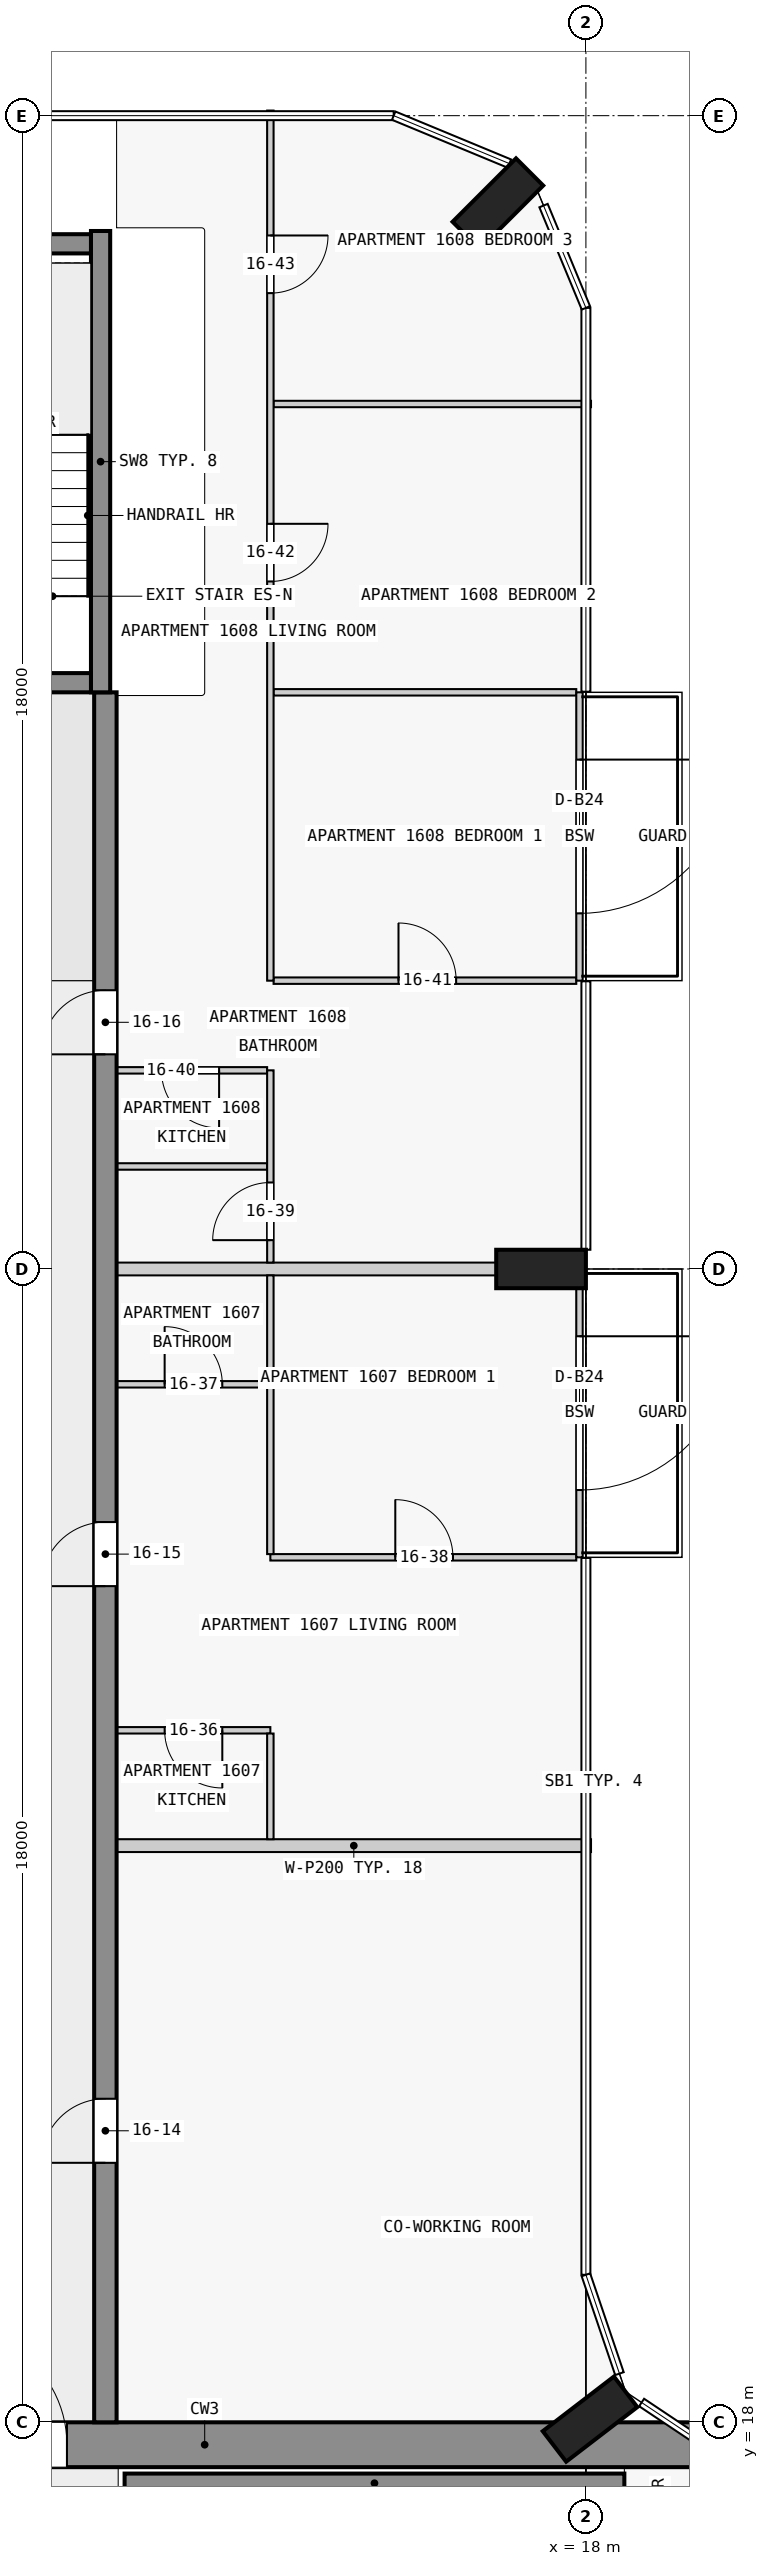
"""IFC4 building model, lengths in metres.
Left out: names, types, materials, properties, quantities, classifications, styles, units other than length and angle.
Written with IfcOpenShell. Run it as: python <this file> out.ifc"""

import sys

from ifc_helpers import new_model, si_unit, direction, frame, frame_2d, origin, origin_2d, place, context, subcontext, project, spatial, rectangle, extrude, element, fill, save


model = new_model("IFC4")
c1 = context("Model", 3, precision=1e-05, world=origin(), true_north=direction((0.0, 1.0)))
c2 = subcontext(c1, "Body", "Model", "MODEL_VIEW")
j1 = project(units=[si_unit("LENGTHUNIT", "METRE"), si_unit("PLANEANGLEUNIT", "RADIAN")], contexts=[c1])
p1 = place(None, origin())
s1 = spatial("IfcSite", under=j1, at=p1, CompositionType="ELEMENT")
p2 = place(p1, origin())
s2 = spatial("IfcBuilding", under=s1, at=p2, CompositionType="ELEMENT")
p3 = place(p2, frame((0.0, 0.0, 65.3)))
s3 = spatial("IfcBuildingStorey", under=s2, at=p3, CompositionType="ELEMENT", Elevation=65.3)
for number, where, z_axis, x_axis in (
    (1, (18.065, 18.05, 0.0), (0.0, 0.0, 1.0), (-0.609, 0.793, 0.0)),
    (2, (17.3, 36.0, 0.0), (0.0, 0.0, 1.0), (0.0, 1.0, 0.0)),
    (3, (16.626, 52.626, 0.0), (0.0, 0.0, 1.0), (-0.707, 0.707, 0.0)),
):
    element("IfcColumn", number, at=place(p3, frame(where, z_axis=z_axis, x_axis=x_axis)), inside=s3, PredefinedType="COLUMN", context=c2, shape_type="SweptSolid", body=[
        extrude(rectangle(XDim=0.6, YDim=1.4, at=origin_2d()), origin(), (0.0, 0.0, 1.0), 3.5),
    ])
p4 = place(p3, frame((1.6, 17.65, 0.0), z_axis=(0.0, 0.0, 1.0), x_axis=(1.0, 0.0, 0.0)))
e4 = element("IfcWall", 4, at=p4, inside=s3, PredefinedType="SHEAR", context=c2, shape_type="SweptSolid", body=[
    extrude(rectangle(XDim=20.9, YDim=0.7, at=frame_2d((10.45, 0.0))), origin(), (0.0, 0.0, 1.0), 3.25),
])
p5 = place(p4, frame((6.5, 0.0, 0.0)))
e5 = element("IfcOpeningElement", 5, at=p5, cuts=e4, PredefinedType="OPENING", context=c2, shape_type="SweptSolid", body=[
    extrude(rectangle(XDim=1.8, YDim=2.1, at=frame_2d((0.9, 1.05))), frame((0.0, 0.36, 0.0), z_axis=(0.0, -1.0, 0.0), x_axis=(1.0, 0.0, 0.0)), (0.0, 0.0, 1.0), 0.72),
])
p6 = place(p3, frame((10.8, 17.05, 0.0), z_axis=(0.0, 0.0, 1.0), x_axis=(1.0, 0.0, 0.0)))
e6 = element("IfcWall", 6, at=p6, inside=s3, PredefinedType="SHEAR", context=c2, shape_type="SweptSolid", body=[
    extrude(rectangle(XDim=7.8, YDim=0.3, at=frame_2d((3.9, 0.0))), origin(), (0.0, 0.0, 1.0), 3.25),
])
p7 = place(p3, frame((7.725, 45.15, 0.0), z_axis=(0.0, 0.0, 1.0), x_axis=(1.0, 0.0, 0.0)))
e7 = element("IfcWall", 7, at=p7, inside=s3, PredefinedType="SHEAR", context=c2, shape_type="SweptSolid", body=[
    extrude(rectangle(XDim=2.55, YDim=0.3, at=frame_2d((1.275, 0.0))), origin(), (0.0, 0.0, 1.0), 3.5),
])
p8 = place(p7, frame((0.725, 0.0, 0.0)))
e8 = element("IfcOpeningElement", 8, at=p8, cuts=e7, PredefinedType="OPENING", context=c2, shape_type="SweptSolid", body=[
    extrude(rectangle(XDim=1.1, YDim=2.1, at=frame_2d((0.55, 1.05))), frame((0.0, 0.16, 0.0), z_axis=(0.0, -1.0, 0.0), x_axis=(1.0, 0.0, 0.0)), (0.0, 0.0, 1.0), 0.32),
])
p9 = place(p3, frame((7.725, 52.0, 0.0), z_axis=(0.0, 0.0, 1.0), x_axis=(1.0, 0.0, 0.0)))
e9 = element("IfcWall", 9, at=p9, inside=s3, PredefinedType="SHEAR", context=c2, shape_type="SweptSolid", body=[
    extrude(rectangle(XDim=2.55, YDim=0.3, at=frame_2d((1.275, 0.0))), origin(), (0.0, 0.0, 1.0), 3.5),
])
p10 = place(p3, frame((10.425, 45.0, 0.0), z_axis=(0.0, 0.0, 1.0), x_axis=(0.0, 1.0, 0.0)))
e10 = element("IfcWall", 10, at=p10, inside=s3, PredefinedType="SHEAR", context=c2, shape_type="SweptSolid", body=[
    extrude(rectangle(XDim=7.2, YDim=0.3, at=frame_2d((3.6, 0.0))), origin(), (0.0, 0.0, 1.0), 3.5),
])
p11 = place(p3, frame((10.5, 18.0, 0.0), z_axis=(0.0, 0.0, 1.0), x_axis=(0.0, 1.0, 0.0)))
e11 = element("IfcWall", 11, at=p11, inside=s3, PredefinedType="SHEAR", context=c2, shape_type="SweptSolid", body=[
    extrude(rectangle(XDim=27.0, YDim=0.35, at=frame_2d((13.5, 0.0))), origin(), (0.0, 0.0, 1.0), 3.25),
])
p12 = place(p11, frame((4.05, 0.0, 0.0)))
e12 = element("IfcOpeningElement", 12, at=p12, cuts=e11, PredefinedType="OPENING", context=c2, shape_type="SweptSolid", body=[
    extrude(rectangle(XDim=1.0, YDim=2.1, at=frame_2d((0.5, 1.05))), frame((0.0, 0.185, 0.0), z_axis=(0.0, -1.0, 0.0), x_axis=(1.0, 0.0, 0.0)), (0.0, 0.0, 1.0), 0.37),
])
p13 = place(p11, frame((13.05, 0.0, 0.0)))
e13 = element("IfcOpeningElement", 13, at=p13, cuts=e11, PredefinedType="OPENING", context=c2, shape_type="SweptSolid", body=[
    extrude(rectangle(XDim=1.0, YDim=2.1, at=frame_2d((0.5, 1.05))), frame((0.0, 0.185, 0.0), z_axis=(0.0, -1.0, 0.0), x_axis=(1.0, 0.0, 0.0)), (0.0, 0.0, 1.0), 0.37),
])
p14 = place(p11, frame((21.35, 0.0, 0.0)))
e14 = element("IfcOpeningElement", 14, at=p14, cuts=e11, PredefinedType="OPENING", context=c2, shape_type="SweptSolid", body=[
    extrude(rectangle(XDim=1.0, YDim=2.1, at=frame_2d((0.5, 1.05))), frame((0.0, 0.185, 0.0), z_axis=(0.0, -1.0, 0.0), x_axis=(1.0, 0.0, 0.0)), (0.0, 0.0, 1.0), 0.37),
])
p15 = place(p3, frame((17.9, 36.0, 0.0), z_axis=(0.0, 0.0, 1.0), x_axis=(0.0, -1.0, 0.0)))
e15 = element("IfcWall", 15, at=p15, inside=s3, PredefinedType="STANDARD", context=c2, shape_type="SweptSolid", body=[
    extrude(rectangle(XDim=4.5, YDim=0.1, at=frame_2d((2.25, 0.0))), origin(), (0.0, 0.0, 1.0), 3.25),
])
p16 = place(p15, frame((1.05, 0.0, 0.0)))
e16 = element("IfcOpeningElement", 16, at=p16, cuts=e15, PredefinedType="OPENING", context=c2, shape_type="SweptSolid", body=[
    extrude(rectangle(XDim=2.4, YDim=2.4, at=frame_2d((1.2, 1.2))), frame((0.0, 0.06, 0.0), z_axis=(0.0, -1.0, 0.0), x_axis=(1.0, 0.0, 0.0)), (0.0, 0.0, 1.0), 0.12),
])
p17 = place(p3, frame((17.9, 45.0, 0.0), z_axis=(0.0, 0.0, 1.0), x_axis=(0.0, -1.0, 0.0)))
e17 = element("IfcWall", 17, at=p17, inside=s3, PredefinedType="STANDARD", context=c2, shape_type="SweptSolid", body=[
    extrude(rectangle(XDim=4.5, YDim=0.1, at=frame_2d((2.25, 0.0))), origin(), (0.0, 0.0, 1.0), 3.25),
])
p18 = place(p17, frame((1.05, 0.0, 0.0)))
e18 = element("IfcOpeningElement", 18, at=p18, cuts=e17, PredefinedType="OPENING", context=c2, shape_type="SweptSolid", body=[
    extrude(rectangle(XDim=2.4, YDim=2.4, at=frame_2d((1.2, 1.2))), frame((0.0, 0.06, 0.0), z_axis=(0.0, -1.0, 0.0), x_axis=(1.0, 0.0, 0.0)), (0.0, 0.0, 1.0), 0.12),
])
p19 = place(p3, frame((18.08, 27.0, 0.0), z_axis=(0.0, 0.0, 1.0), x_axis=(-1.0, 0.0, 0.0)))
e19 = element("IfcWall", 19, at=p19, inside=s3, PredefinedType="PARTITIONING", context=c2, shape_type="SweptSolid", body=[
    extrude(rectangle(XDim=7.405, YDim=0.2, at=frame_2d((3.703, 0.0))), origin(), (0.0, 0.0, 1.0), 3.25),
])
p20 = place(p3, frame((13.075, 28.8, 0.0), z_axis=(0.0, 0.0, 1.0), x_axis=(-1.0, 0.0, 0.0)))
e20 = element("IfcWall", 20, at=p20, inside=s3, PredefinedType="PARTITIONING", context=c2, shape_type="SweptSolid", body=[
    extrude(rectangle(XDim=2.4, YDim=0.1, at=frame_2d((1.2, 0.0))), origin(), (0.0, 0.0, 1.0), 3.25),
])
p21 = place(p20, frame((0.75, 0.0, 0.0)))
e21 = element("IfcOpeningElement", 21, at=p21, cuts=e20, PredefinedType="OPENING", context=c2, shape_type="SweptSolid", body=[
    extrude(rectangle(XDim=0.9, YDim=2.1, at=frame_2d((0.45, 1.05))), frame((0.0, 0.06, 0.0), z_axis=(0.0, -1.0, 0.0), x_axis=(1.0, 0.0, 0.0)), (0.0, 0.0, 1.0), 0.12),
])
p22 = place(p3, frame((13.075, 31.5, 0.0), z_axis=(0.0, 0.0, 1.0), x_axis=(1.0, 0.0, 0.0)))
e22 = element("IfcWall", 22, at=p22, inside=s3, PredefinedType="PARTITIONING", context=c2, shape_type="SweptSolid", body=[
    extrude(rectangle(XDim=4.775, YDim=0.1, at=frame_2d((2.388, 0.0))), origin(), (0.0, 0.0, 1.0), 3.25),
])
p23 = place(p22, frame((1.95, 0.0, 0.0)))
e23 = element("IfcOpeningElement", 23, at=p23, cuts=e22, PredefinedType="OPENING", context=c2, shape_type="SweptSolid", body=[
    extrude(rectangle(XDim=0.9, YDim=2.1, at=frame_2d((0.45, 1.05))), frame((0.0, 0.06, 0.0), z_axis=(0.0, -1.0, 0.0), x_axis=(1.0, 0.0, 0.0)), (0.0, 0.0, 1.0), 0.12),
])
p24 = place(p3, frame((10.675, 34.2, 0.0), z_axis=(0.0, 0.0, 1.0), x_axis=(1.0, 0.0, 0.0)))
e24 = element("IfcWall", 24, at=p24, inside=s3, PredefinedType="PARTITIONING", context=c2, shape_type="SweptSolid", body=[
    extrude(rectangle(XDim=2.35, YDim=0.1, at=frame_2d((1.175, 0.0))), origin(), (0.0, 0.0, 1.0), 3.25),
])
p25 = place(p24, frame((0.75, 0.0, 0.0)))
e25 = element("IfcOpeningElement", 25, at=p25, cuts=e24, PredefinedType="OPENING", context=c2, shape_type="SweptSolid", body=[
    extrude(rectangle(XDim=0.9, YDim=2.1, at=frame_2d((0.45, 1.05))), frame((0.0, 0.06, 0.0), z_axis=(0.0, -1.0, 0.0), x_axis=(1.0, 0.0, 0.0)), (0.0, 0.0, 1.0), 0.12),
])
p26 = place(p3, frame((16.6, 36.0, 0.0), z_axis=(0.0, 0.0, 1.0), x_axis=(-1.0, 0.0, 0.0)))
e26 = element("IfcWall", 26, at=p26, inside=s3, PredefinedType="PARTITIONING", context=c2, shape_type="SweptSolid", body=[
    extrude(rectangle(XDim=5.925, YDim=0.2, at=frame_2d((2.962, 0.0))), origin(), (0.0, 0.0, 1.0), 3.25),
])
p27 = place(p3, frame((13.025, 37.6, 0.0), z_axis=(0.0, 0.0, 1.0), x_axis=(-1.0, 0.0, 0.0)))
e27 = element("IfcWall", 27, at=p27, inside=s3, PredefinedType="PARTITIONING", context=c2, shape_type="SweptSolid", body=[
    extrude(rectangle(XDim=2.35, YDim=0.1, at=frame_2d((1.175, 0.0))), origin(), (0.0, 0.0, 1.0), 3.25),
])
p28 = place(p3, frame((13.025, 39.1, 0.0), z_axis=(0.0, 0.0, 1.0), x_axis=(-1.0, 0.0, 0.0)))
e28 = element("IfcWall", 28, at=p28, inside=s3, PredefinedType="PARTITIONING", context=c2, shape_type="SweptSolid", body=[
    extrude(rectangle(XDim=2.35, YDim=0.1, at=frame_2d((1.175, 0.0))), origin(), (0.0, 0.0, 1.0), 3.25),
])
p29 = place(p28, frame((0.75, 0.0, 0.0)))
e29 = element("IfcOpeningElement", 29, at=p29, cuts=e28, PredefinedType="OPENING", context=c2, shape_type="SweptSolid", body=[
    extrude(rectangle(XDim=0.9, YDim=2.1, at=frame_2d((0.45, 1.05))), frame((0.0, 0.06, 0.0), z_axis=(0.0, -1.0, 0.0), x_axis=(1.0, 0.0, 0.0)), (0.0, 0.0, 1.0), 0.12),
])
p30 = place(p3, frame((13.125, 40.5, 0.0), z_axis=(0.0, 0.0, 1.0), x_axis=(1.0, 0.0, 0.0)))
e30 = element("IfcWall", 30, at=p30, inside=s3, PredefinedType="PARTITIONING", context=c2, shape_type="SweptSolid", body=[
    extrude(rectangle(XDim=4.725, YDim=0.1, at=frame_2d((2.363, 0.0))), origin(), (0.0, 0.0, 1.0), 3.25),
])
p31 = place(p30, frame((1.95, 0.0, 0.0)))
e31 = element("IfcOpeningElement", 31, at=p31, cuts=e30, PredefinedType="OPENING", context=c2, shape_type="SweptSolid", body=[
    extrude(rectangle(XDim=0.9, YDim=2.1, at=frame_2d((0.45, 1.05))), frame((0.0, 0.06, 0.0), z_axis=(0.0, -1.0, 0.0), x_axis=(1.0, 0.0, 0.0)), (0.0, 0.0, 1.0), 0.12),
])
p32 = place(p3, frame((17.85, 45.0, 0.0), z_axis=(0.0, 0.0, 1.0), x_axis=(-1.0, 0.0, 0.0)))
e32 = element("IfcWall", 32, at=p32, inside=s3, PredefinedType="PARTITIONING", context=c2, shape_type="SweptSolid", body=[
    extrude(rectangle(XDim=4.725, YDim=0.1, at=frame_2d((2.363, 0.0))), origin(), (0.0, 0.0, 1.0), 3.25),
])
p33 = place(p3, frame((18.08, 49.5, 0.0), z_axis=(0.0, 0.0, 1.0), x_axis=(-1.0, 0.0, 0.0)))
e33 = element("IfcWall", 33, at=p33, inside=s3, PredefinedType="PARTITIONING", context=c2, shape_type="SweptSolid", body=[
    extrude(rectangle(XDim=4.955, YDim=0.1, at=frame_2d((2.478, 0.0))), origin(), (0.0, 0.0, 1.0), 3.25),
])
p34 = place(p3, frame((13.075, 34.15, 0.0), z_axis=(0.0, 0.0, 1.0), x_axis=(0.0, -1.0, 0.0)))
e34 = element("IfcWall", 34, at=p34, inside=s3, PredefinedType="PARTITIONING", context=c2, shape_type="SweptSolid", body=[
    extrude(rectangle(XDim=2.6, YDim=0.1, at=frame_2d((1.3, 0.0))), origin(), (0.0, 0.0, 1.0), 3.25),
])
p35 = place(p3, frame((13.075, 54.08, 0.0), z_axis=(0.0, 0.0, 1.0), x_axis=(0.0, -1.0, 0.0)))
e35 = element("IfcWall", 35, at=p35, inside=s3, PredefinedType="PARTITIONING", context=c2, shape_type="SweptSolid", body=[
    extrude(rectangle(XDim=13.58, YDim=0.1, at=frame_2d((6.79, 0.0))), origin(), (0.0, 0.0, 1.0), 3.25),
])
p36 = place(p35, frame((6.45, 0.0, 0.0)))
e36 = element("IfcOpeningElement", 36, at=p36, cuts=e35, PredefinedType="OPENING", context=c2, shape_type="SweptSolid", body=[
    extrude(rectangle(XDim=0.9, YDim=2.1, at=frame_2d((0.45, 1.05))), frame((0.0, 0.06, 0.0), z_axis=(0.0, -1.0, 0.0), x_axis=(1.0, 0.0, 0.0)), (0.0, 0.0, 1.0), 0.12),
])
p37 = place(p35, frame((1.95, 0.0, 0.0)))
e37 = element("IfcOpeningElement", 37, at=p37, cuts=e35, PredefinedType="OPENING", context=c2, shape_type="SweptSolid", body=[
    extrude(rectangle(XDim=0.9, YDim=2.1, at=frame_2d((0.45, 1.05))), frame((0.0, 0.06, 0.0), z_axis=(0.0, -1.0, 0.0), x_axis=(1.0, 0.0, 0.0)), (0.0, 0.0, 1.0), 0.12),
])
p38 = place(p3, frame((13.075, 27.1, 0.0), z_axis=(0.0, 0.0, 1.0), x_axis=(0.0, 1.0, 0.0)))
e38 = element("IfcWall", 38, at=p38, inside=s3, PredefinedType="PARTITIONING", context=c2, shape_type="SweptSolid", body=[
    extrude(rectangle(XDim=1.65, YDim=0.1, at=frame_2d((0.825, 0.0))), origin(), (0.0, 0.0, 1.0), 3.25),
])
p39 = place(p3, frame((13.075, 34.2, 0.0), z_axis=(0.0, 0.0, 1.0), x_axis=(0.0, 1.0, 0.0)))
e39 = element("IfcWall", 39, at=p39, inside=s3, PredefinedType="PARTITIONING", context=c2, shape_type="SweptSolid", body=[
    extrude(rectangle(XDim=1.7, YDim=0.1, at=frame_2d((0.85, 0.0))), origin(), (0.0, 0.0, 1.0), 3.25),
])
p40 = place(p3, frame((13.075, 36.1, 0.0), z_axis=(0.0, 0.0, 1.0), x_axis=(0.0, 1.0, 0.0)))
e40 = element("IfcWall", 40, at=p40, inside=s3, PredefinedType="PARTITIONING", context=c2, shape_type="SweptSolid", body=[
    extrude(rectangle(XDim=3.0, YDim=0.1, at=frame_2d((1.5, 0.0))), origin(), (0.0, 0.0, 1.0), 3.25),
])
p41 = place(p40, frame((0.35, 0.0, 0.0)))
e41 = element("IfcOpeningElement", 41, at=p41, cuts=e40, PredefinedType="OPENING", context=c2, shape_type="SweptSolid", body=[
    extrude(rectangle(XDim=0.9, YDim=2.1, at=frame_2d((0.45, 1.05))), frame((0.0, 0.06, 0.0), z_axis=(0.0, -1.0, 0.0), x_axis=(1.0, 0.0, 0.0)), (0.0, 0.0, 1.0), 0.12),
])
p42 = place(p16, origin())
e42 = element("IfcDoor", 42, at=p42, inside=s3, OperationType="SINGLE_SWING_LEFT", PredefinedType="DOOR", context=c2, shape_type="SweptSolid", body=[
    extrude(rectangle(XDim=2.4, YDim=2.4, at=frame_2d((1.2, 1.2))), frame((0.0, 0.025, 0.0), z_axis=(0.0, -1.0, 0.0), x_axis=(1.0, 0.0, 0.0)), (0.0, 0.0, 1.0), 0.05),
])
fill(e16, e42)
p43 = place(p18, origin())
e43 = element("IfcDoor", 43, at=p43, inside=s3, OperationType="SINGLE_SWING_LEFT", PredefinedType="DOOR", context=c2, shape_type="SweptSolid", body=[
    extrude(rectangle(XDim=2.4, YDim=2.4, at=frame_2d((1.2, 1.2))), frame((0.0, 0.025, 0.0), z_axis=(0.0, -1.0, 0.0), x_axis=(1.0, 0.0, 0.0)), (0.0, 0.0, 1.0), 0.05),
])
fill(e18, e43)
p44 = place(p5, origin())
e44 = element("IfcDoor", 44, at=p44, inside=s3, OperationType="DOUBLE_DOOR_SINGLE_SWING", PredefinedType="DOOR", context=c2, shape_type="SweptSolid", body=[
    extrude(rectangle(XDim=1.8, YDim=2.1, at=frame_2d((0.9, 1.05))), frame((0.0, 0.025, 0.0), z_axis=(0.0, -1.0, 0.0), x_axis=(1.0, 0.0, 0.0)), (0.0, 0.0, 1.0), 0.05),
])
fill(e5, e44)
p45 = place(p12, origin())
e45 = element("IfcDoor", 45, at=p45, inside=s3, OperationType="SINGLE_SWING_LEFT", PredefinedType="DOOR", context=c2, shape_type="SweptSolid", body=[
    extrude(rectangle(XDim=1.0, YDim=2.1, at=frame_2d((0.5, 1.05))), frame((0.0, 0.025, 0.0), z_axis=(0.0, -1.0, 0.0), x_axis=(1.0, 0.0, 0.0)), (0.0, 0.0, 1.0), 0.05),
])
fill(e12, e45)
p46 = place(p13, origin())
e46 = element("IfcDoor", 46, at=p46, inside=s3, OperationType="SINGLE_SWING_RIGHT", PredefinedType="DOOR", context=c2, shape_type="SweptSolid", body=[
    extrude(rectangle(XDim=1.0, YDim=2.1, at=frame_2d((0.5, 1.05))), frame((0.0, 0.025, 0.0), z_axis=(0.0, -1.0, 0.0), x_axis=(1.0, 0.0, 0.0)), (0.0, 0.0, 1.0), 0.05),
])
fill(e13, e46)
p47 = place(p14, origin())
e47 = element("IfcDoor", 47, at=p47, inside=s3, OperationType="SINGLE_SWING_RIGHT", PredefinedType="DOOR", context=c2, shape_type="SweptSolid", body=[
    extrude(rectangle(XDim=1.0, YDim=2.1, at=frame_2d((0.5, 1.05))), frame((0.0, 0.025, 0.0), z_axis=(0.0, -1.0, 0.0), x_axis=(1.0, 0.0, 0.0)), (0.0, 0.0, 1.0), 0.05),
])
fill(e14, e47)
p48 = place(p21, origin())
e48 = element("IfcDoor", 48, at=p48, inside=s3, OperationType="SINGLE_SWING_RIGHT", PredefinedType="DOOR", context=c2, shape_type="SweptSolid", body=[
    extrude(rectangle(XDim=0.9, YDim=2.1, at=frame_2d((0.45, 1.05))), frame((0.0, 0.025, 0.0), z_axis=(0.0, -1.0, 0.0), x_axis=(1.0, 0.0, 0.0)), (0.0, 0.0, 1.0), 0.05),
])
fill(e21, e48)
p49 = place(p25, origin())
e49 = element("IfcDoor", 49, at=p49, inside=s3, OperationType="SINGLE_SWING_RIGHT", PredefinedType="DOOR", context=c2, shape_type="SweptSolid", body=[
    extrude(rectangle(XDim=0.9, YDim=2.1, at=frame_2d((0.45, 1.05))), frame((0.0, 0.025, 0.0), z_axis=(0.0, -1.0, 0.0), x_axis=(1.0, 0.0, 0.0)), (0.0, 0.0, 1.0), 0.05),
])
fill(e25, e49)
p50 = place(p23, origin())
e50 = element("IfcDoor", 50, at=p50, inside=s3, OperationType="SINGLE_SWING_RIGHT", PredefinedType="DOOR", context=c2, shape_type="SweptSolid", body=[
    extrude(rectangle(XDim=0.9, YDim=2.1, at=frame_2d((0.45, 1.05))), frame((0.0, 0.025, 0.0), z_axis=(0.0, -1.0, 0.0), x_axis=(1.0, 0.0, 0.0)), (0.0, 0.0, 1.0), 0.05),
])
fill(e23, e50)
p51 = place(p41, origin())
e51 = element("IfcDoor", 51, at=p51, inside=s3, OperationType="SINGLE_SWING_LEFT", PredefinedType="DOOR", context=c2, shape_type="SweptSolid", body=[
    extrude(rectangle(XDim=0.9, YDim=2.1, at=frame_2d((0.45, 1.05))), frame((0.0, 0.025, 0.0), z_axis=(0.0, -1.0, 0.0), x_axis=(1.0, 0.0, 0.0)), (0.0, 0.0, 1.0), 0.05),
])
fill(e41, e51)
p52 = place(p29, origin())
e52 = element("IfcDoor", 52, at=p52, inside=s3, OperationType="SINGLE_SWING_RIGHT", PredefinedType="DOOR", context=c2, shape_type="SweptSolid", body=[
    extrude(rectangle(XDim=0.9, YDim=2.1, at=frame_2d((0.45, 1.05))), frame((0.0, 0.025, 0.0), z_axis=(0.0, -1.0, 0.0), x_axis=(1.0, 0.0, 0.0)), (0.0, 0.0, 1.0), 0.05),
])
fill(e29, e52)
p53 = place(p31, origin())
e53 = element("IfcDoor", 53, at=p53, inside=s3, OperationType="SINGLE_SWING_RIGHT", PredefinedType="DOOR", context=c2, shape_type="SweptSolid", body=[
    extrude(rectangle(XDim=0.9, YDim=2.1, at=frame_2d((0.45, 1.05))), frame((0.0, 0.025, 0.0), z_axis=(0.0, -1.0, 0.0), x_axis=(1.0, 0.0, 0.0)), (0.0, 0.0, 1.0), 0.05),
])
fill(e31, e53)
p54 = place(p36, origin())
e54 = element("IfcDoor", 54, at=p54, inside=s3, OperationType="SINGLE_SWING_RIGHT", PredefinedType="DOOR", context=c2, shape_type="SweptSolid", body=[
    extrude(rectangle(XDim=0.9, YDim=2.1, at=frame_2d((0.45, 1.05))), frame((0.0, 0.025, 0.0), z_axis=(0.0, -1.0, 0.0), x_axis=(1.0, 0.0, 0.0)), (0.0, 0.0, 1.0), 0.05),
])
fill(e36, e54)
p55 = place(p37, origin())
e55 = element("IfcDoor", 55, at=p55, inside=s3, OperationType="SINGLE_SWING_LEFT", PredefinedType="DOOR", context=c2, shape_type="SweptSolid", body=[
    extrude(rectangle(XDim=0.9, YDim=2.1, at=frame_2d((0.45, 1.05))), frame((0.0, 0.025, 0.0), z_axis=(0.0, -1.0, 0.0), x_axis=(1.0, 0.0, 0.0)), (0.0, 0.0, 1.0), 0.05),
])
fill(e37, e55)
save(model, sys.argv[1])
